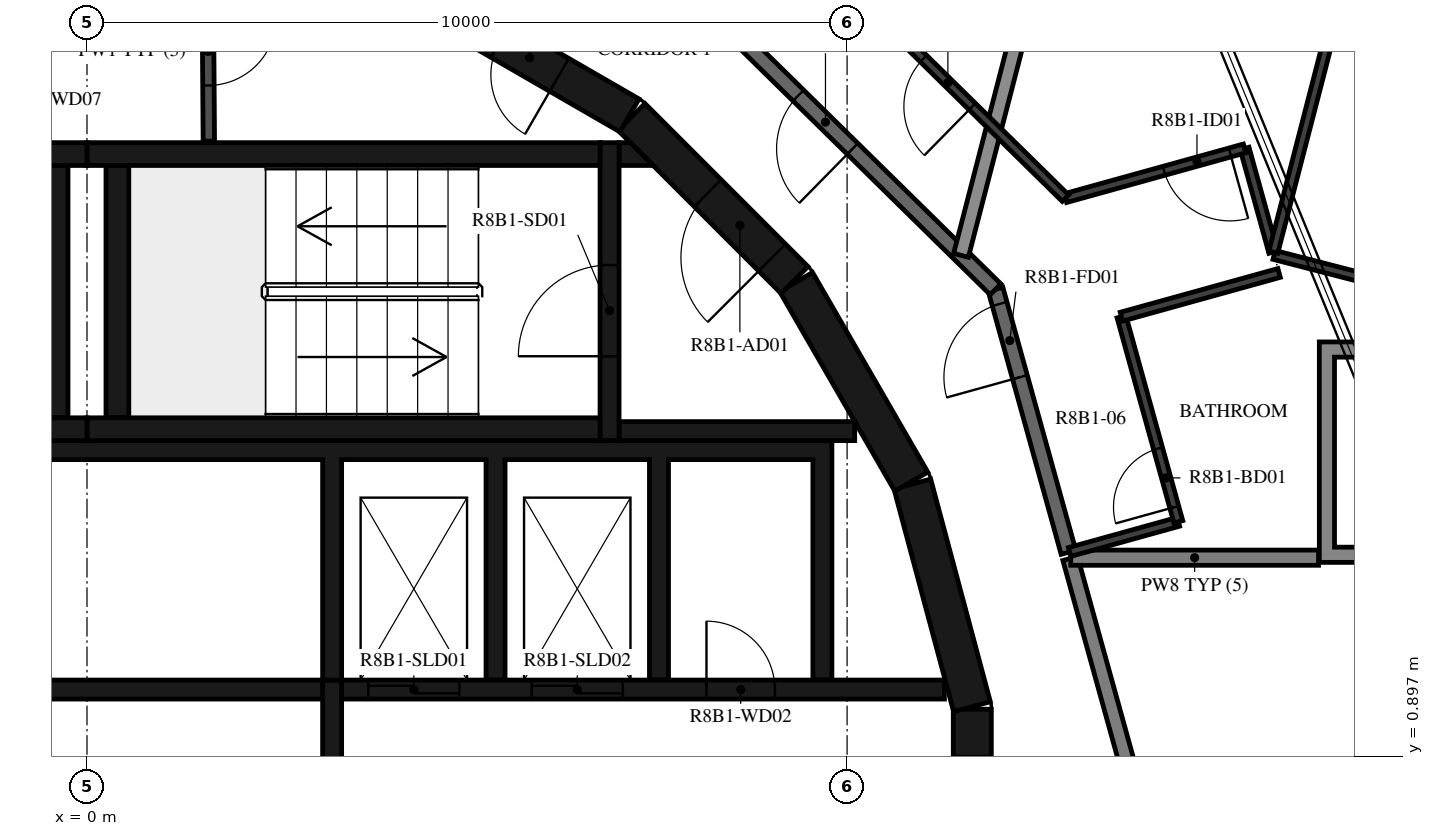
"""IFC4 building model, lengths in metres.
Left out: names, types, materials, properties, quantities, classifications, styles, units other than length and angle.
Written with IfcOpenShell. Run it as: python <this file> out.ifc"""

import sys

from ifc_helpers import new_model, si_unit, direction, frame, frame_2d, origin, place, context, subcontext, project, spatial, polyline, rectangle, outline, extrude, element, fill, save


model = new_model("IFC4")
c1 = context("Model", 3, precision=1e-05, world=origin(), true_north=direction((0.0, 1.0)))
c2 = subcontext(c1, "Body", "Model", "MODEL_VIEW")
j1 = project(units=[si_unit("LENGTHUNIT", "METRE"), si_unit("PLANEANGLEUNIT", "RADIAN")], contexts=[c1])
p1 = place(None, origin())
s1 = spatial("IfcSite", under=j1, at=p1, CompositionType="ELEMENT")
p2 = place(p1, origin())
s2 = spatial("IfcBuilding", under=s1, at=p2, CompositionType="ELEMENT")
p3 = place(p2, frame((0.0, 0.0, 308.7)))
s3 = spatial("IfcBuildingStorey", under=s2, at=p3, CompositionType="ELEMENT", Elevation=308.7)
p4 = place(p3, frame((11.647, -1.516, 0.0), z_axis=(0.0, 0.0, 1.0), x_axis=(0.0, 1.0, 0.0)))
e1 = element("IfcWall", 1, at=p4, inside=s3, PredefinedType="SHEAR", context=c2, shape_type="SweptSolid", body=[
    extrude(rectangle(XDim=3.033, YDim=0.5, at=frame_2d((1.516, 0.0))), origin(), (0.0, 0.0, 1.0), 3.12),
])
p5 = place(p4, frame((0.616, 0.0, 0.0)))
e2 = element("IfcOpeningElement", 2, at=p5, cuts=e1, PredefinedType="OPENING", context=c2, shape_type="SweptSolid", body=[
    extrude(rectangle(XDim=1.8, YDim=2.1, at=frame_2d((0.9, 1.05))), frame((0.0, 0.26, 0.0), z_axis=(0.0, -1.0, 0.0), x_axis=(1.0, 0.0, 0.0)), (0.0, 0.0, 1.0), 0.52),
])
for number, where, z_axis, x_axis in (
    (3, (11.643, 1.55, 0.0), (0.0, 0.0, 1.0), (-0.259, 0.966, 0.0)),
    (4, (10.845, 4.51, 0.0), (0.0, 0.0, 1.0), (-0.5, 0.866, 0.0)),
):
    element("IfcWall", number, at=place(p3, frame(where, z_axis=z_axis, x_axis=x_axis)), inside=s3, PredefinedType="SHEAR", context=c2, shape_type="SweptSolid", body=[
        extrude(rectangle(XDim=3.033, YDim=0.5, at=frame_2d((1.516, 0.0))), origin(), (0.0, 0.0, 1.0), 3.12),
    ])
p6 = place(p3, frame((9.308, 7.164, 0.0), z_axis=(0.0, 0.0, 1.0), x_axis=(-0.707106781187, 0.707106781187, 0.0)))
e5 = element("IfcWall", 5, at=p6, inside=s3, PredefinedType="SHEAR", context=c2, shape_type="SweptSolid", body=[
    extrude(rectangle(XDim=3.032, YDim=0.5, at=frame_2d((1.516, 0.0))), origin(), (0.0, 0.0, 1.0), 3.12),
])
p7 = place(p6, frame((0.416, 0.0, 0.0)))
e6 = element("IfcOpeningElement", 6, at=p7, cuts=e5, PredefinedType="OPENING", context=c2, shape_type="SweptSolid", body=[
    extrude(rectangle(XDim=1.2, YDim=2.1, at=frame_2d((0.6, 1.05))), frame((0.0, 0.26, 0.0), z_axis=(0.0, -1.0, 0.0), x_axis=(1.0, 0.0, 0.0)), (0.0, 0.0, 1.0), 0.52),
])
p8 = place(p3, frame((7.137, 9.329, 0.0), z_axis=(0.0, 0.0, 1.0), x_axis=(-0.865975092491, 0.500087131594, 0.0)))
e7 = element("IfcWall", 7, at=p8, inside=s3, PredefinedType="SHEAR", context=c2, shape_type="SweptSolid", body=[
    extrude(rectangle(XDim=3.033, YDim=0.5, at=frame_2d((1.516, 0.0))), origin(), (0.0, 0.0, 1.0), 3.12),
])
p9 = place(p8, frame((1.066, 0.0, 0.0)))
e8 = element("IfcOpeningElement", 8, at=p9, cuts=e7, PredefinedType="OPENING", context=c2, shape_type="SweptSolid", body=[
    extrude(rectangle(XDim=0.9, YDim=2.1, at=frame_2d((0.45, 1.05))), frame((0.0, 0.26, 0.0), z_axis=(0.0, -1.0, 0.0), x_axis=(1.0, 0.0, 0.0)), (0.0, 0.0, 1.0), 0.52),
])
for number, where, z_axis, x_axis in (
    (9, (0.0, 5.2, 0.0), (0.0, 0.0, 1.0), (1.0, 0.0, 0.0)),
    (10, (0.0, 8.82, 0.0), (0.0, 0.0, 1.0), (1.0, 0.0, 0.0)),
):
    element("IfcWall", number, at=place(p3, frame(where, z_axis=z_axis, x_axis=x_axis)), inside=s3, PredefinedType="SHEAR", context=c2, shape_type="SweptSolid", body=[
        extrude(rectangle(XDim=6.75, YDim=0.3, at=frame_2d((3.375, 0.0))), origin(), (0.0, 0.0, 1.0), 3.12),
    ])
p10 = place(p3, frame((0.4, 5.35, 0.0), z_axis=(0.0, 0.0, 1.0), x_axis=(0.0, 1.0, 0.0)))
e11 = element("IfcWall", 11, at=p10, inside=s3, PredefinedType="SHEAR", context=c2, shape_type="SweptSolid", body=[
    extrude(rectangle(XDim=3.32, YDim=0.3, at=frame_2d((1.66, 0.0))), origin(), (0.0, 0.0, 1.0), 3.12),
])
p11 = place(p3, frame((6.875, 5.05, 0.0), z_axis=(0.0, 0.0, 1.0), x_axis=(0.0, 1.0, 0.0)))
e12 = element("IfcWall", 12, at=p11, inside=s3, PredefinedType="SHEAR", context=c2, shape_type="SweptSolid", body=[
    extrude(rectangle(XDim=3.92, YDim=0.25, at=frame_2d((1.96, 0.0))), origin(), (0.0, 0.0, 1.0), 3.12),
])
p12 = place(p11, frame((1.11, 0.0, 0.0)))
e13 = element("IfcOpeningElement", 13, at=p12, cuts=e12, PredefinedType="OPENING", context=c2, shape_type="SweptSolid", body=[
    extrude(rectangle(XDim=1.2, YDim=2.1, at=frame_2d((0.6, 1.05))), frame((0.0, 0.135, 0.0), z_axis=(0.0, -1.0, 0.0), x_axis=(1.0, 0.0, 0.0)), (0.0, 0.0, 1.0), 0.27),
])
p13 = place(p3, frame((7.0, 5.175, 0.0), z_axis=(0.0, 0.0, 1.0), x_axis=(1.0, 0.0, 0.0)))
e14 = element("IfcWall", 14, at=p13, inside=s3, PredefinedType="SHEAR", context=c2, shape_type="SweptSolid", body=[
    extrude(rectangle(XDim=3.1, YDim=0.25, at=frame_2d((1.55, 0.0))), origin(), (0.0, 0.0, 1.0), 3.12),
])
p14 = place(p3, origin())
e15 = element("IfcWall", 15, at=p14, inside=s3, PredefinedType="SHEAR", context=c2, shape_type="SweptSolid", body=[
    extrude(outline(polyline([(7.448, 8.67), (7.0, 8.67), (7.0, 8.97), (7.148, 8.97), (7.448, 8.67)])), origin(), (0.0, 0.0, 1.0), 3.12),
])
for number, where, z_axis, x_axis in (
    (16, (-6.75, 5.2, 0.0), (0.0, 0.0, 1.0), (1.0, 0.0, 0.0)),
    (17, (-6.75, 8.82, 0.0), (0.0, 0.0, 1.0), (1.0, 0.0, 0.0)),
):
    element("IfcWall", number, at=place(p3, frame(where, z_axis=z_axis, x_axis=x_axis)), inside=s3, PredefinedType="SHEAR", context=c2, shape_type="SweptSolid", body=[
        extrude(rectangle(XDim=6.75, YDim=0.3, at=frame_2d((3.375, 0.0))), origin(), (0.0, 0.0, 1.0), 3.12),
    ])
p15 = place(p3, frame((-0.4, 5.35, 0.0), z_axis=(0.0, 0.0, 1.0), x_axis=(0.0, 1.0, 0.0)))
e18 = element("IfcWall", 18, at=p15, inside=s3, PredefinedType="SHEAR", context=c2, shape_type="SweptSolid", body=[
    extrude(rectangle(XDim=3.32, YDim=0.3, at=frame_2d((1.66, 0.0))), origin(), (0.0, 0.0, 1.0), 3.12),
])
p16 = place(p3, origin())
e19 = element("IfcWall", 19, at=p16, inside=s3, PredefinedType="SHEAR", context=c2, shape_type="SweptSolid", body=[
    extrude(outline(polyline([(-9.8, 1.9), (-9.55, 1.9), (-9.55, 4.8), (3.1, 4.8), (3.1, 1.9), (3.35, 1.9), (3.35, 4.8), (5.25, 4.8), (5.25, 1.9), (5.5, 1.9), (5.5, 4.8), (7.4, 4.8), (7.4, 1.9), (7.65, 1.9), (7.65, 4.8), (9.55, 4.8), (9.55, 1.9), (9.8, 1.9), (9.8, 4.8), (9.8, 5.05), (-9.8, 5.05), (-9.8, 4.8), (-9.8, 1.9)])), origin(), (0.0, 0.0, 1.0), 3.12),
])
p17 = place(p3, frame((-11.28, 1.775, 0.0), z_axis=(0.0, 0.0, 1.0), x_axis=(1.0, 0.0, 0.0)))
e20 = element("IfcWall", 20, at=p17, inside=s3, PredefinedType="SHEAR", context=c2, shape_type="SweptSolid", body=[
    extrude(rectangle(XDim=14.38, YDim=0.25, at=frame_2d((7.19, 0.0))), origin(), (0.0, 0.0, 1.0), 3.12),
])
p18 = place(p17, frame((7.605, 0.0, 0.0)))
e21 = element("IfcOpeningElement", 21, at=p18, cuts=e20, PredefinedType="OPENING", context=c2, shape_type="SweptSolid", body=[
    extrude(rectangle(XDim=0.9, YDim=2.1, at=frame_2d((0.45, 1.05))), frame((0.0, 0.135, 0.0), z_axis=(0.0, -1.0, 0.0), x_axis=(1.0, 0.0, 0.0)), (0.0, 0.0, 1.0), 0.27),
])
p19 = place(p3, frame((3.35, 1.775, 0.0), z_axis=(0.0, 0.0, 1.0), x_axis=(1.0, 0.0, 0.0)))
e22 = element("IfcWall", 22, at=p19, inside=s3, PredefinedType="SHEAR", context=c2, shape_type="SweptSolid", body=[
    extrude(rectangle(XDim=7.93, YDim=0.25, at=frame_2d((3.965, 0.0))), origin(), (0.0, 0.0, 1.0), 3.12),
])
p20 = place(p19, frame((0.35, 0.0, 0.0)))
e23 = element("IfcOpeningElement", 23, at=p20, cuts=e22, PredefinedType="OPENING", context=c2, shape_type="SweptSolid", body=[
    extrude(rectangle(XDim=1.2, YDim=2.4, at=frame_2d((0.6, 1.2))), frame((0.0, 0.135, 0.0), z_axis=(0.0, -1.0, 0.0), x_axis=(1.0, 0.0, 0.0)), (0.0, 0.0, 1.0), 0.27),
])
p21 = place(p19, frame((2.5, 0.0, 0.0)))
e24 = element("IfcOpeningElement", 24, at=p21, cuts=e22, PredefinedType="OPENING", context=c2, shape_type="SweptSolid", body=[
    extrude(rectangle(XDim=1.2, YDim=2.4, at=frame_2d((0.6, 1.2))), frame((0.0, 0.135, 0.0), z_axis=(0.0, -1.0, 0.0), x_axis=(1.0, 0.0, 0.0)), (0.0, 0.0, 1.0), 0.27),
])
p22 = place(p19, frame((4.8, 0.0, 0.0)))
e25 = element("IfcOpeningElement", 25, at=p22, cuts=e22, PredefinedType="OPENING", context=c2, shape_type="SweptSolid", body=[
    extrude(rectangle(XDim=0.9, YDim=2.1, at=frame_2d((0.45, 1.05))), frame((0.0, 0.135, 0.0), z_axis=(0.0, -1.0, 0.0), x_axis=(1.0, 0.0, 0.0)), (0.0, 0.0, 1.0), 0.27),
])
p23 = place(p3, frame((3.225, -1.9, 0.0), z_axis=(0.0, 0.0, 1.0), x_axis=(0.0, 1.0, 0.0)))
e26 = element("IfcWall", 26, at=p23, inside=s3, PredefinedType="SHEAR", context=c2, shape_type="SweptSolid", body=[
    extrude(rectangle(XDim=3.8, YDim=0.25, at=frame_2d((1.9, 0.0))), origin(), (0.0, 0.0, 1.0), 3.12),
])
p24 = place(p3, frame((1.586, 11.354, 0.0), z_axis=(0.0, 0.0, 1.0), x_axis=(0.007227482881, -0.999973881405, 0.0)))
e27 = element("IfcWall", 27, at=p24, inside=s3, PredefinedType="PARTITIONING", context=c2, shape_type="SweptSolid", body=[
    extrude(rectangle(XDim=2.365, YDim=0.15, at=frame_2d((1.182, 0.0))), origin(), (0.0, 0.0, 1.0), 3.12),
])
p25 = place(p24, frame((0.732, 0.0, 0.0)))
e28 = element("IfcOpeningElement", 28, at=p25, cuts=e27, PredefinedType="OPENING", context=c2, shape_type="SweptSolid", body=[
    extrude(rectangle(XDim=0.9, YDim=2.1, at=frame_2d((0.45, 1.05))), frame((0.0, 0.085, 0.0), z_axis=(0.0, -1.0, 0.0), x_axis=(1.0, 0.0, 0.0)), (0.0, 0.0, 1.0), 0.17),
])
p26 = place(p3, frame((13.872, 0.121, 0.0), z_axis=(0.0, 0.0, 1.0), x_axis=(-0.267291928416, 0.963615600228, 0.0)))
e29 = element("IfcWall", 29, at=p26, inside=s3, PredefinedType="STANDARD", context=c2, shape_type="SweptSolid", body=[
    extrude(rectangle(XDim=3.507, YDim=0.2, at=frame_2d((1.753, 0.0))), origin(), (0.0, 0.0, 1.0), 3.12),
])
p27 = place(p3, frame((12.913, 3.581, 0.0), z_axis=(0.0, 0.0, 1.0), x_axis=(-0.267223005422, 0.963634715737, 0.0)))
e30 = element("IfcWall", 30, at=p27, inside=s3, PredefinedType="STANDARD", context=c2, shape_type="SweptSolid", body=[
    extrude(rectangle(XDim=3.591, YDim=0.2, at=frame_2d((1.795, 0.0))), origin(), (0.0, 0.0, 1.0), 3.12),
])
p28 = place(p27, frame((2.39, 0.0, 0.0)))
e31 = element("IfcOpeningElement", 31, at=p28, cuts=e30, PredefinedType="OPENING", context=c2, shape_type="SweptSolid", body=[
    extrude(rectangle(XDim=1.0, YDim=2.1, at=frame_2d((0.5, 1.05))), frame((0.0, 0.11, 0.0), z_axis=(0.0, -1.0, 0.0), x_axis=(1.0, 0.0, 0.0)), (0.0, 0.0, 1.0), 0.22),
])
p29 = place(p3, frame((11.953, 7.041, 0.0), z_axis=(0.0, 0.0, 1.0), x_axis=(-0.713250549143, 0.70090916255, 0.0)))
e32 = element("IfcWall", 32, at=p29, inside=s3, PredefinedType="STANDARD", context=c2, shape_type="SweptSolid", body=[
    extrude(rectangle(XDim=7.181, YDim=0.2, at=frame_2d((3.59, 0.0))), origin(), (0.0, 0.0, 1.0), 3.12),
])
p30 = place(p29, frame((2.637, 0.0, 0.0)))
e33 = element("IfcOpeningElement", 33, at=p30, cuts=e32, PredefinedType="OPENING", context=c2, shape_type="SweptSolid", body=[
    extrude(rectangle(XDim=1.0, YDim=2.1, at=frame_2d((0.5, 1.05))), frame((0.0, 0.11, 0.0), z_axis=(0.0, -1.0, 0.0), x_axis=(1.0, 0.0, 0.0)), (0.0, 0.0, 1.0), 0.22),
])
p31 = place(p3, frame((16.203, 3.51, 0.0), z_axis=(0.0, 0.0, 1.0), x_axis=(-1.0, 0.0, 0.0)))
e34 = element("IfcWall", 34, at=p31, inside=s3, PredefinedType="STANDARD", context=c2, shape_type="SweptSolid", body=[
    extrude(rectangle(XDim=3.26, YDim=0.2, at=frame_2d((1.63, 0.0))), origin(), (0.0, 0.0, 1.0), 3.12),
])
p32 = place(p3, frame((13.26, 14.3, 0.0), z_axis=(0.0, 0.0, 1.0), x_axis=(-0.250397400042, -0.968143141303, 0.0)))
e35 = element("IfcWall", 35, at=p32, inside=s3, PredefinedType="STANDARD", context=c2, shape_type="SweptSolid", body=[
    extrude(rectangle(XDim=7.037, YDim=0.2, at=frame_2d((3.518, 0.0))), origin(), (0.0, 0.0, 1.0), 2.73),
])
p33 = place(p3, frame((12.927, 3.585, 0.0), z_axis=(0.0, 0.0, 1.0), x_axis=(0.963616756608, 0.26728775951, 0.0)))
e36 = element("IfcWall", 36, at=p33, inside=s3, PredefinedType="PARTITIONING", context=c2, shape_type="SweptSolid", body=[
    extrude(rectangle(XDim=1.485, YDim=0.12, at=frame_2d((0.743, 0.0))), origin(), (0.0, 0.0, 1.0), 3.12),
])
p34 = place(p3, frame((14.358, 3.982, 0.0), z_axis=(0.0, 0.0, 1.0), x_axis=(-0.267275166053, 0.963620249689, 0.0)))
e37 = element("IfcWall", 37, at=p34, inside=s3, PredefinedType="PARTITIONING", context=c2, shape_type="SweptSolid", body=[
    extrude(rectangle(XDim=2.801, YDim=0.12, at=frame_2d((1.4, 0.0))), origin(), (0.0, 0.0, 1.0), 3.12),
])
p35 = place(p34, frame((0.2, 0.0, 0.0)))
e38 = element("IfcOpeningElement", 38, at=p35, cuts=e37, PredefinedType="OPENING", context=c2, shape_type="SweptSolid", body=[
    extrude(rectangle(XDim=0.8, YDim=2.1, at=frame_2d((0.4, 1.05))), frame((0.0, 0.07, 0.0), z_axis=(0.0, -1.0, 0.0), x_axis=(1.0, 0.0, 0.0)), (0.0, 0.0, 1.0), 0.14),
])
p36 = place(p3, frame((13.61, 6.681, 0.0), z_axis=(0.0, 0.0, 1.0), x_axis=(0.963626714087, 0.267251858551, 0.0)))
e39 = element("IfcWall", 39, at=p36, inside=s3, PredefinedType="PARTITIONING", context=c2, shape_type="SweptSolid", body=[
    extrude(rectangle(XDim=2.152, YDim=0.12, at=frame_2d((1.076, 0.0))), origin(), (0.0, 0.0, 1.0), 3.12),
])
p37 = place(p3, frame((15.608, 7.53, 0.0), z_axis=(0.0, 0.0, 1.0), x_axis=(-0.267172351994, 0.963648760872, 0.0)))
e40 = element("IfcWall", 40, at=p37, inside=s3, PredefinedType="PARTITIONING", context=c2, shape_type="SweptSolid", body=[
    extrude(rectangle(XDim=1.416, YDim=0.12, at=frame_2d((0.708, 0.0))), origin(), (0.0, 0.0, 1.0), 3.12),
])
p38 = place(p3, frame((15.229, 8.894, 0.0), z_axis=(0.0, 0.0, 1.0), x_axis=(-0.96363793677, -0.267211389759, 0.0)))
e41 = element("IfcWall", 41, at=p38, inside=s3, PredefinedType="PARTITIONING", context=c2, shape_type="SweptSolid", body=[
    extrude(rectangle(XDim=2.446, YDim=0.12, at=frame_2d((1.223, 0.0))), origin(), (0.0, 0.0, 1.0), 3.12),
])
p39 = place(p38, frame((0.2, 0.0, 0.0)))
e42 = element("IfcOpeningElement", 42, at=p39, cuts=e41, PredefinedType="OPENING", context=c2, shape_type="SweptSolid", body=[
    extrude(rectangle(XDim=0.9, YDim=2.1, at=frame_2d((0.45, 1.05))), frame((0.0, 0.07, 0.0), z_axis=(0.0, -1.0, 0.0), x_axis=(1.0, 0.0, 0.0)), (0.0, 0.0, 1.0), 0.14),
])
p40 = place(p3, frame((12.873, 8.24, 0.0), z_axis=(0.0, 0.0, 1.0), x_axis=(-0.713251042219, 0.700908660792, 0.0)))
e43 = element("IfcWall", 43, at=p40, inside=s3, PredefinedType="PARTITIONING", context=c2, shape_type="SweptSolid", body=[
    extrude(rectangle(XDim=7.398, YDim=0.12, at=frame_2d((3.699, 0.0))), origin(), (0.0, 0.0, 1.0), 3.12),
])
p41 = place(p40, frame((1.718, 0.0, 0.0)))
e44 = element("IfcOpeningElement", 44, at=p41, cuts=e43, PredefinedType="OPENING", context=c2, shape_type="SweptSolid", body=[
    extrude(rectangle(XDim=0.9, YDim=2.1, at=frame_2d((0.45, 1.05))), frame((0.0, 0.07, 0.0), z_axis=(0.0, -1.0, 0.0), x_axis=(1.0, 0.0, 0.0)), (0.0, 0.0, 1.0), 0.14),
])
p42 = place(p3, frame((17.825, 6.922, 0.0), z_axis=(0.0, 0.0, 1.0), x_axis=(-0.968151834511, 0.250363785985, 0.0)))
e45 = element("IfcWall", 45, at=p42, inside=s3, PredefinedType="PARTITIONING", context=c2, shape_type="SweptSolid", body=[
    extrude(rectangle(XDim=2.28, YDim=0.12, at=frame_2d((1.14, 0.0))), origin(), (0.0, 0.0, 1.0), 3.12),
])
p43 = place(p3, frame((17.102, 13.307, 0.0), z_axis=(0.0, 0.0, 1.0), x_axis=(-0.250374225748, -0.968149134731, 0.0)))
e46 = element("IfcWall", 46, at=p43, inside=s3, PredefinedType="PARTITIONING", context=c2, shape_type="SweptSolid", body=[
    extrude(rectangle(XDim=5.967, YDim=0.12, at=frame_2d((2.983, 0.0))), origin(), (0.0, 0.0, 1.0), 3.12),
])
p44 = place(p43, frame((0.2, 0.0, 0.0)))
e47 = element("IfcOpeningElement", 47, at=p44, cuts=e46, PredefinedType="OPENING", context=c2, shape_type="SweptSolid", body=[
    extrude(rectangle(XDim=0.9, YDim=2.1, at=frame_2d((0.45, 1.05))), frame((0.0, 0.07, 0.0), z_axis=(0.0, -1.0, 0.0), x_axis=(1.0, 0.0, 0.0)), (0.0, 0.0, 1.0), 0.14),
])
p45 = place(p3, origin())
e48 = element("IfcWall", 48, at=p45, inside=s3, PredefinedType="STANDARD", context=c2, shape_type="SweptSolid", body=[
    extrude(outline(polyline([(19.113, 6.348), (19.113, 3.448), (16.213, 3.448), (16.213, 6.348), (19.113, 6.348)]), holes=[polyline([(16.413, 3.648), (18.913, 3.648), (18.913, 6.148), (16.413, 6.148), (16.413, 3.648)])]), origin(), (0.0, 0.0, 1.0), 3.12),
])
p46 = place(p12, origin())
e49 = element("IfcDoor", 49, at=p46, inside=s3, OperationType="SINGLE_SWING_LEFT", PredefinedType="DOOR", context=c2, shape_type="SweptSolid", body=[
    extrude(rectangle(XDim=1.2, YDim=2.1, at=frame_2d((0.6, 1.05))), frame((0.0, 0.025, 0.0), z_axis=(0.0, -1.0, 0.0), x_axis=(1.0, 0.0, 0.0)), (0.0, 0.0, 1.0), 0.05),
])
fill(e13, e49)
p47 = place(p7, origin())
e50 = element("IfcDoor", 50, at=p47, inside=s3, OperationType="SINGLE_SWING_RIGHT", PredefinedType="DOOR", context=c2, shape_type="SweptSolid", body=[
    extrude(rectangle(XDim=1.2, YDim=2.1, at=frame_2d((0.6, 1.05))), frame((0.0, 0.025, 0.0), z_axis=(0.0, -1.0, 0.0), x_axis=(1.0, 0.0, 0.0)), (0.0, 0.0, 1.0), 0.05),
])
fill(e6, e50)
p48 = place(p20, origin())
e51 = element("IfcDoor", 51, at=p48, inside=s3, OperationType="DOUBLE_DOOR_SLIDING", PredefinedType="DOOR", context=c2, shape_type="SweptSolid", body=[
    extrude(rectangle(XDim=1.2, YDim=2.4, at=frame_2d((0.6, 1.2))), frame((0.0, 0.025, 0.0), z_axis=(0.0, -1.0, 0.0), x_axis=(1.0, 0.0, 0.0)), (0.0, 0.0, 1.0), 0.05),
])
fill(e23, e51)
p49 = place(p21, origin())
e52 = element("IfcDoor", 52, at=p49, inside=s3, OperationType="DOUBLE_DOOR_SLIDING", PredefinedType="DOOR", context=c2, shape_type="SweptSolid", body=[
    extrude(rectangle(XDim=1.2, YDim=2.4, at=frame_2d((0.6, 1.2))), frame((0.0, 0.025, 0.0), z_axis=(0.0, -1.0, 0.0), x_axis=(1.0, 0.0, 0.0)), (0.0, 0.0, 1.0), 0.05),
])
fill(e24, e52)
p50 = place(p22, origin())
e53 = element("IfcDoor", 53, at=p50, inside=s3, OperationType="SINGLE_SWING_RIGHT", PredefinedType="DOOR", context=c2, shape_type="SweptSolid", body=[
    extrude(rectangle(XDim=0.9, YDim=2.1, at=frame_2d((0.45, 1.05))), frame((0.0, 0.025, 0.0), z_axis=(0.0, -1.0, 0.0), x_axis=(1.0, 0.0, 0.0)), (0.0, 0.0, 1.0), 0.05),
])
fill(e25, e53)
p51 = place(p25, origin())
e54 = element("IfcDoor", 54, at=p51, inside=s3, OperationType="SINGLE_SWING_RIGHT", PredefinedType="DOOR", context=c2, shape_type="SweptSolid", body=[
    extrude(rectangle(XDim=0.9, YDim=2.1, at=frame_2d((0.45, 1.05))), frame((0.0, 0.025, 0.0), z_axis=(0.0, -1.0, 0.0), x_axis=(1.0, 0.0, 0.0)), (0.0, 0.0, 1.0), 0.05),
])
fill(e28, e54)
p52 = place(p9, origin())
e55 = element("IfcDoor", 55, at=p52, inside=s3, OperationType="SINGLE_SWING_RIGHT", PredefinedType="DOOR", context=c2, shape_type="SweptSolid", body=[
    extrude(rectangle(XDim=0.9, YDim=2.1, at=frame_2d((0.45, 1.05))), frame((0.0, 0.025, 0.0), z_axis=(0.0, -1.0, 0.0), x_axis=(1.0, 0.0, 0.0)), (0.0, 0.0, 1.0), 0.05),
])
fill(e8, e55)
p53 = place(p28, origin())
e56 = element("IfcDoor", 56, at=p53, inside=s3, OperationType="SINGLE_SWING_LEFT", PredefinedType="DOOR", context=c2, shape_type="SweptSolid", body=[
    extrude(rectangle(XDim=1.0, YDim=2.1, at=frame_2d((0.5, 1.05))), frame((0.0, 0.025, 0.0), z_axis=(0.0, -1.0, 0.0), x_axis=(1.0, 0.0, 0.0)), (0.0, 0.0, 1.0), 0.05),
])
fill(e31, e56)
p54 = place(p35, origin())
e57 = element("IfcDoor", 57, at=p54, inside=s3, OperationType="SINGLE_SWING_LEFT", PredefinedType="DOOR", context=c2, shape_type="SweptSolid", body=[
    extrude(rectangle(XDim=0.8, YDim=2.1, at=frame_2d((0.4, 1.05))), frame((0.0, 0.025, 0.0), z_axis=(0.0, -1.0, 0.0), x_axis=(1.0, 0.0, 0.0)), (0.0, 0.0, 1.0), 0.05),
])
fill(e38, e57)
p55 = place(p39, origin())
e58 = element("IfcDoor", 58, at=p55, inside=s3, OperationType="SINGLE_SWING_LEFT", PredefinedType="DOOR", context=c2, shape_type="SweptSolid", body=[
    extrude(rectangle(XDim=0.9, YDim=2.1, at=frame_2d((0.45, 1.05))), frame((0.0, 0.025, 0.0), z_axis=(0.0, -1.0, 0.0), x_axis=(1.0, 0.0, 0.0)), (0.0, 0.0, 1.0), 0.05),
])
fill(e42, e58)
p56 = place(p30, origin())
e59 = element("IfcDoor", 59, at=p56, inside=s3, OperationType="SINGLE_SWING_LEFT", PredefinedType="DOOR", context=c2, shape_type="SweptSolid", body=[
    extrude(rectangle(XDim=1.0, YDim=2.1, at=frame_2d((0.5, 1.05))), frame((0.0, 0.025, 0.0), z_axis=(0.0, -1.0, 0.0), x_axis=(1.0, 0.0, 0.0)), (0.0, 0.0, 1.0), 0.05),
])
fill(e33, e59)
p57 = place(p41, origin())
e60 = element("IfcDoor", 60, at=p57, inside=s3, OperationType="SINGLE_SWING_LEFT", PredefinedType="DOOR", context=c2, shape_type="SweptSolid", body=[
    extrude(rectangle(XDim=0.9, YDim=2.1, at=frame_2d((0.45, 1.05))), frame((0.0, 0.025, 0.0), z_axis=(0.0, -1.0, 0.0), x_axis=(1.0, 0.0, 0.0)), (0.0, 0.0, 1.0), 0.05),
])
fill(e44, e60)
save(model, sys.argv[1])
